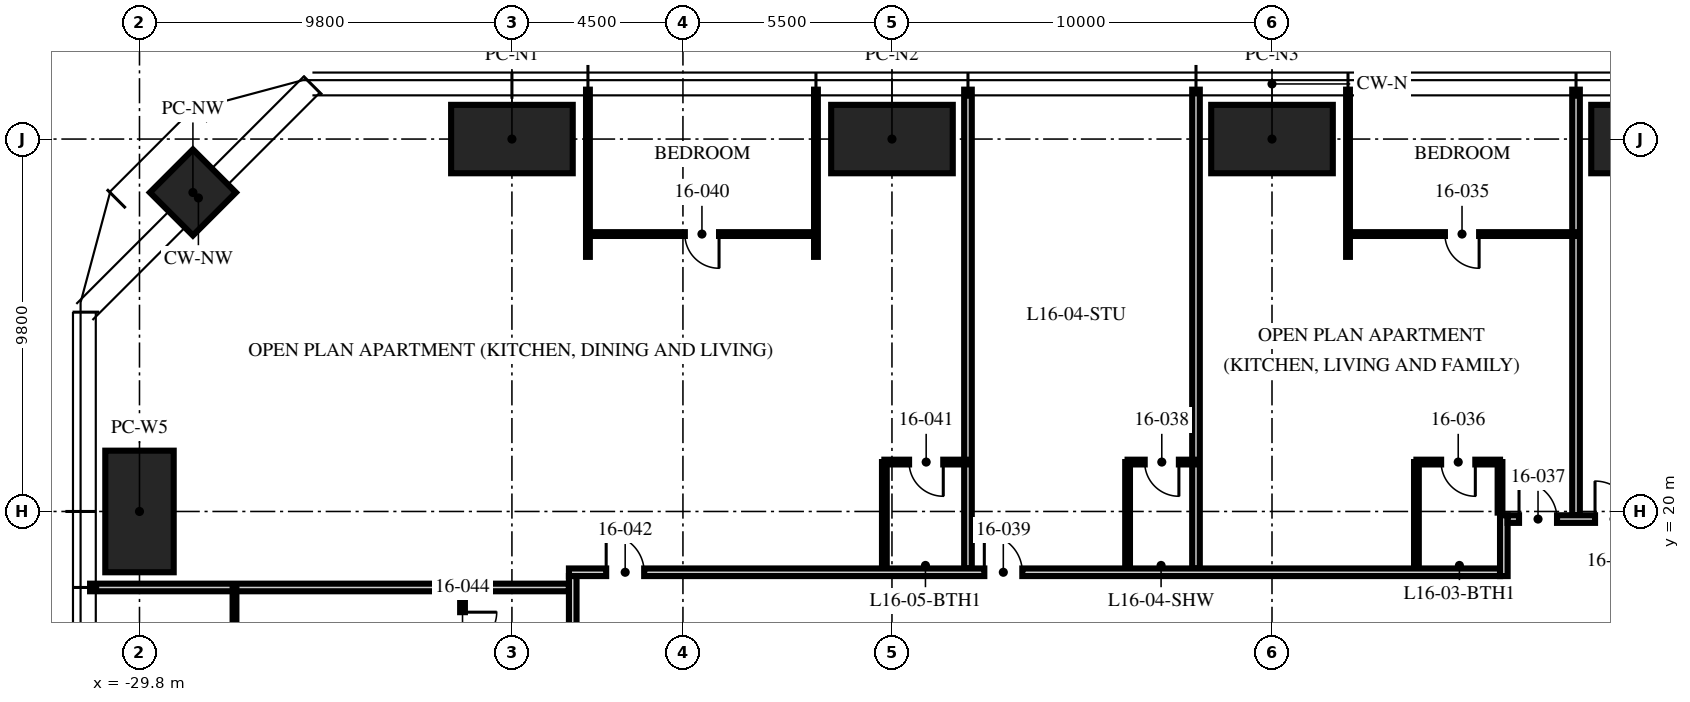
"""IFC4 building model, lengths in metres.
Left out: names, types, materials, properties, quantities, classifications, styles, units other than length and angle.
Written with IfcOpenShell. Run it as: python <this file> out.ifc"""

import sys

from ifc_helpers import new_model, si_unit, direction, frame, frame_2d, origin, origin_2d, place, context, subcontext, project, spatial, rectangle, hollow_rectangle, extrude, element, fill, save


model = new_model("IFC4")
c1 = context("Model", 3, precision=1e-05, world=origin(), true_north=direction((0.0, 1.0)))
c2 = subcontext(c1, "Body", "Model", "MODEL_VIEW")
j1 = project(units=[si_unit("LENGTHUNIT", "METRE"), si_unit("PLANEANGLEUNIT", "RADIAN")], contexts=[c1])
p1 = place(None, origin())
s1 = spatial("IfcSite", under=j1, at=p1, CompositionType="ELEMENT")
p2 = place(p1, origin())
s2 = spatial("IfcBuilding", under=s1, at=p2, CompositionType="ELEMENT")
p3 = place(p2, frame((0.0, 0.0, 66.0)))
s3 = spatial("IfcBuildingStorey", under=s2, at=p3, CompositionType="ELEMENT", Elevation=66.0)
for number, where, z_axis, x_axis in (
    (1, (-20.0, 29.8, 0.0), (0.0, 0.0, 1.0), (1.0, 0.0, 0.0)),
    (2, (-10.0, 29.8, 0.0), (0.0, 0.0, 1.0), (1.0, 0.0, 0.0)),
    (3, (0.0, 29.8, 0.0), (0.0, 0.0, 1.0), (1.0, 0.0, 0.0)),
    (4, (10.0, 29.8, 0.0), (0.0, 0.0, 1.0), (1.0, 0.0, 0.0)),
    (5, (-29.8, 20.0, 0.0), (0.0, 0.0, 1.0), (0.0, 1.0, 0.0)),
):
    element("IfcColumn", number, at=place(p3, frame(where, z_axis=z_axis, x_axis=x_axis)), inside=s3, PredefinedType="COLUMN", context=c2, shape_type="SweptSolid", body=[
        extrude(hollow_rectangle(XDim=3.2, YDim=1.8, WallThickness=0.2, at=origin_2d()), origin(), (0.0, 0.0, 1.0), 3.75),
    ])
p4 = place(p3, frame((-28.394, 28.394, 0.0), z_axis=(0.0, 0.0, 1.0), x_axis=(0.707106781187, 0.707106781187, 0.0)))
e6 = element("IfcColumn", 6, at=p4, inside=s3, PredefinedType="COLUMN", context=c2, shape_type="SweptSolid", body=[
    extrude(hollow_rectangle(XDim=1.6, YDim=1.6, WallThickness=0.1, at=origin_2d()), origin(), (0.0, 0.0, 1.0), 3.75),
])
p5 = place(p3, frame((8.0, 19.9, 0.0), z_axis=(0.0, 0.0, 1.0), x_axis=(0.0, 1.0, 0.0)))
e7 = element("IfcWall", 7, at=p5, inside=s3, PredefinedType="PARTITIONING", context=c2, shape_type="SweptSolid", body=[
    extrude(rectangle(XDim=11.2, YDim=0.2, at=frame_2d((5.6, 0.0))), origin(), (0.0, 0.0, 1.0), 2.71),
])
p6 = place(p3, frame((2.0, 26.7, 0.0), z_axis=(0.0, 0.0, 1.0), x_axis=(0.0, 1.0, 0.0)))
e8 = element("IfcWall", 8, at=p6, inside=s3, PredefinedType="PARTITIONING", context=c2, shape_type="SweptSolid", body=[
    extrude(rectangle(XDim=4.4, YDim=0.1, at=frame_2d((2.2, 0.0))), origin(), (0.0, 0.0, 1.0), 2.71),
])
for number, where, z_axis, x_axis in (
    (9, (-2.0, 18.5, 0.0), (0.0, 0.0, 1.0), (0.0, 1.0, 0.0)),
    (10, (-8.0, 18.5, 0.0), (0.0, 0.0, 1.0), (0.0, 1.0, 0.0)),
):
    element("IfcWall", number, at=place(p3, frame(where, z_axis=z_axis, x_axis=x_axis)), inside=s3, PredefinedType="PARTITIONING", context=c2, shape_type="SweptSolid", body=[
        extrude(rectangle(XDim=12.6, YDim=0.2, at=frame_2d((6.3, 0.0))), origin(), (0.0, 0.0, 1.0), 2.71),
    ])
for number, where, z_axis, x_axis in (
    (11, (-12.0, 26.7, 0.0), (0.0, 0.0, 1.0), (0.0, 1.0, 0.0)),
    (12, (-18.0, 26.7, 0.0), (0.0, 0.0, 1.0), (0.0, 1.0, 0.0)),
):
    element("IfcWall", number, at=place(p3, frame(where, z_axis=z_axis, x_axis=x_axis)), inside=s3, PredefinedType="PARTITIONING", context=c2, shape_type="SweptSolid", body=[
        extrude(rectangle(XDim=4.4, YDim=0.1, at=frame_2d((2.2, 0.0))), origin(), (0.0, 0.0, 1.0), 2.71),
    ])
p7 = place(p3, frame((-18.5, 18.0, 0.0), z_axis=(0.0, 0.0, 1.0), x_axis=(-1.0, 0.0, 0.0)))
e13 = element("IfcWall", 13, at=p7, inside=s3, PredefinedType="PARTITIONING", context=c2, shape_type="SweptSolid", body=[
    extrude(rectangle(XDim=12.6, YDim=0.2, at=frame_2d((6.3, 0.0))), origin(), (0.0, 0.0, 1.0), 2.3),
])
p8 = place(p3, frame((8.0, 27.3, 0.0), z_axis=(0.0, 0.0, 1.0), x_axis=(-1.0, 0.0, 0.0)))
e14 = element("IfcWall", 14, at=p8, inside=s3, PredefinedType="PARTITIONING", context=c2, shape_type="SweptSolid", body=[
    extrude(rectangle(XDim=6.0, YDim=0.1, at=frame_2d((3.0, 0.0))), origin(), (0.0, 0.0, 1.0), 2.61),
])
p9 = place(p8, frame((2.55, 0.0, 0.0)))
e15 = element("IfcOpeningElement", 15, at=p9, cuts=e14, PredefinedType="OPENING", context=c2, shape_type="SweptSolid", body=[
    extrude(rectangle(XDim=0.9, YDim=2.1, at=frame_2d((0.45, 1.05))), frame((0.0, 0.06, 0.0), z_axis=(0.0, -1.0, 0.0), x_axis=(1.0, 0.0, 0.0)), (0.0, 0.0, 1.0), 0.12),
])
p10 = place(p3, frame((6.0, 21.3, 0.0), z_axis=(0.0, 0.0, 1.0), x_axis=(-1.0, 0.0, 0.0)))
e16 = element("IfcWall", 16, at=p10, inside=s3, PredefinedType="PARTITIONING", context=c2, shape_type="SweptSolid", body=[
    extrude(rectangle(XDim=2.2, YDim=0.125, at=frame_2d((1.1, 0.0))), origin(), (0.0, 0.0, 1.0), 2.61),
])
p11 = place(p10, frame((0.65, 0.0, 0.0)))
e17 = element("IfcOpeningElement", 17, at=p11, cuts=e16, PredefinedType="OPENING", context=c2, shape_type="SweptSolid", body=[
    extrude(rectangle(XDim=0.9, YDim=2.1, at=frame_2d((0.45, 1.05))), frame((0.0, 0.073, 0.0), z_axis=(0.0, -1.0, 0.0), x_axis=(1.0, 0.0, 0.0)), (0.0, 0.0, 1.0), 0.145),
])
p12 = place(p3, frame((6.0, 19.97, 0.0), z_axis=(0.0, 0.0, 1.0), x_axis=(0.0, 1.0, 0.0)))
e18 = element("IfcWall", 18, at=p12, inside=s3, PredefinedType="PARTITIONING", context=c2, shape_type="SweptSolid", body=[
    extrude(rectangle(XDim=1.33, YDim=0.125, at=frame_2d((0.665, 0.0))), origin(), (0.0, 0.0, 1.0), 3.5),
])
p13 = place(p3, frame((3.8, 18.5, 0.0), z_axis=(0.0, 0.0, 1.0), x_axis=(0.0, 1.0, 0.0)))
e19 = element("IfcWall", 19, at=p13, inside=s3, PredefinedType="PARTITIONING", context=c2, shape_type="SweptSolid", body=[
    extrude(rectangle(XDim=2.8, YDim=0.125, at=frame_2d((1.4, 0.0))), origin(), (0.0, 0.0, 1.0), 3.5),
])
p14 = place(p3, frame((-2.0, 21.3, 0.0), z_axis=(0.0, 0.0, 1.0), x_axis=(-1.0, 0.0, 0.0)))
e20 = element("IfcWall", 20, at=p14, inside=s3, PredefinedType="PARTITIONING", context=c2, shape_type="SweptSolid", body=[
    extrude(rectangle(XDim=1.8, YDim=0.125, at=frame_2d((0.9, 0.0))), origin(), (0.0, 0.0, 1.0), 3.5),
])
p15 = place(p14, frame((0.45, 0.0, 0.0)))
e21 = element("IfcOpeningElement", 21, at=p15, cuts=e20, PredefinedType="OPENING", context=c2, shape_type="SweptSolid", body=[
    extrude(rectangle(XDim=0.9, YDim=2.1, at=frame_2d((0.45, 1.05))), frame((0.0, 0.073, 0.0), z_axis=(0.0, -1.0, 0.0), x_axis=(1.0, 0.0, 0.0)), (0.0, 0.0, 1.0), 0.145),
])
p16 = place(p3, frame((-3.8, 18.5, 0.0), z_axis=(0.0, 0.0, 1.0), x_axis=(0.0, 1.0, 0.0)))
e22 = element("IfcWall", 22, at=p16, inside=s3, PredefinedType="PARTITIONING", context=c2, shape_type="SweptSolid", body=[
    extrude(rectangle(XDim=2.8, YDim=0.125, at=frame_2d((1.4, 0.0))), origin(), (0.0, 0.0, 1.0), 3.5),
])
p17 = place(p3, frame((-12.0, 27.3, 0.0), z_axis=(0.0, 0.0, 1.0), x_axis=(-1.0, 0.0, 0.0)))
e23 = element("IfcWall", 23, at=p17, inside=s3, PredefinedType="PARTITIONING", context=c2, shape_type="SweptSolid", body=[
    extrude(rectangle(XDim=6.0, YDim=0.1, at=frame_2d((3.0, 0.0))), origin(), (0.0, 0.0, 1.0), 2.61),
])
p18 = place(p17, frame((2.55, 0.0, 0.0)))
e24 = element("IfcOpeningElement", 24, at=p18, cuts=e23, PredefinedType="OPENING", context=c2, shape_type="SweptSolid", body=[
    extrude(rectangle(XDim=0.9, YDim=2.1, at=frame_2d((0.45, 1.05))), frame((0.0, 0.06, 0.0), z_axis=(0.0, -1.0, 0.0), x_axis=(1.0, 0.0, 0.0)), (0.0, 0.0, 1.0), 0.12),
])
p19 = place(p3, frame((-8.0, 21.3, 0.0), z_axis=(0.0, 0.0, 1.0), x_axis=(-1.0, 0.0, 0.0)))
e25 = element("IfcWall", 25, at=p19, inside=s3, PredefinedType="PARTITIONING", context=c2, shape_type="SweptSolid", body=[
    extrude(rectangle(XDim=2.2, YDim=0.125, at=frame_2d((1.1, 0.0))), origin(), (0.0, 0.0, 1.0), 2.492),
])
p20 = place(p19, frame((0.65, 0.0, 0.0)))
e26 = element("IfcOpeningElement", 26, at=p20, cuts=e25, PredefinedType="OPENING", context=c2, shape_type="SweptSolid", body=[
    extrude(rectangle(XDim=0.9, YDim=2.1, at=frame_2d((0.45, 1.05))), frame((0.0, 0.073, 0.0), z_axis=(0.0, -1.0, 0.0), x_axis=(1.0, 0.0, 0.0)), (0.0, 0.0, 1.0), 0.145),
])
p21 = place(p3, frame((-10.2, 18.5, 0.0), z_axis=(0.0, 0.0, 1.0), x_axis=(0.0, 1.0, 0.0)))
e27 = element("IfcWall", 27, at=p21, inside=s3, PredefinedType="PARTITIONING", context=c2, shape_type="SweptSolid", body=[
    extrude(rectangle(XDim=2.8, YDim=0.125, at=frame_2d((1.4, 0.0))), origin(), (0.0, 0.0, 1.0), 2.492),
])
p22 = place(p3, frame((-27.3, 18.0, 0.0), z_axis=(0.0, 0.0, 1.0), x_axis=(0.0, -1.0, 0.0)))
e28 = element("IfcWall", 28, at=p22, inside=s3, PredefinedType="PARTITIONING", context=c2, shape_type="SweptSolid", body=[
    extrude(rectangle(XDim=6.0, YDim=0.1, at=frame_2d((3.0, 0.0))), origin(), (0.0, 0.0, 1.0), 2.61),
])
p23 = place(p22, frame((2.55, 0.0, 0.0)))
e29 = element("IfcOpeningElement", 29, at=p23, cuts=e28, PredefinedType="OPENING", context=c2, shape_type="SweptSolid", body=[
    extrude(rectangle(XDim=0.9, YDim=2.1, at=frame_2d((0.45, 1.05))), frame((0.0, 0.06, 0.0), z_axis=(0.0, -1.0, 0.0), x_axis=(1.0, 0.0, 0.0)), (0.0, 0.0, 1.0), 0.12),
])
p24 = place(p3, frame((-21.3, 18.0, 0.0), z_axis=(0.0, 0.0, 1.0), x_axis=(0.0, -1.0, 0.0)))
e30 = element("IfcWall", 30, at=p24, inside=s3, PredefinedType="PARTITIONING", context=c2, shape_type="SweptSolid", body=[
    extrude(rectangle(XDim=2.2, YDim=0.125, at=frame_2d((1.1, 0.0))), origin(), (0.0, 0.0, 1.0), 3.5),
])
p25 = place(p24, frame((0.65, 0.0, 0.0)))
e31 = element("IfcOpeningElement", 31, at=p25, cuts=e30, PredefinedType="OPENING", context=c2, shape_type="SweptSolid", body=[
    extrude(rectangle(XDim=0.9, YDim=2.1, at=frame_2d((0.45, 1.05))), frame((0.0, 0.073, 0.0), z_axis=(0.0, -1.0, 0.0), x_axis=(1.0, 0.0, 0.0)), (0.0, 0.0, 1.0), 0.145),
])
p26 = place(p3, frame((-18.5, 18.4, 0.0), z_axis=(0.0, 0.0, 1.0), x_axis=(1.0, 0.0, 0.0)))
e32 = element("IfcWall", 32, at=p26, inside=s3, PredefinedType="PARTITIONING", context=c2, shape_type="SweptSolid", body=[
    extrude(rectangle(XDim=24.5, YDim=0.2, at=frame_2d((12.25, 0.0))), origin(), (0.0, 0.0, 1.0), 2.3),
])
p27 = place(p26, frame((10.93, 0.0, 0.0)))
e33 = element("IfcOpeningElement", 33, at=p27, cuts=e32, PredefinedType="OPENING", context=c2, shape_type="SweptSolid", body=[
    extrude(rectangle(XDim=1.0, YDim=2.2, at=frame_2d((0.5, 1.1))), frame((0.0, 0.11, 0.0), z_axis=(0.0, -1.0, 0.0), x_axis=(1.0, 0.0, 0.0)), (0.0, 0.0, 1.0), 0.22),
])
p28 = place(p26, frame((0.98, 0.0, 0.0)))
e34 = element("IfcOpeningElement", 34, at=p28, cuts=e32, PredefinedType="OPENING", context=c2, shape_type="SweptSolid", body=[
    extrude(rectangle(XDim=1.0, YDim=2.2, at=frame_2d((0.5, 1.1))), frame((0.0, 0.11, 0.0), z_axis=(0.0, -1.0, 0.0), x_axis=(1.0, 0.0, 0.0)), (0.0, 0.0, 1.0), 0.22),
])
p29 = place(p3, frame((6.1, 18.3, 0.0), z_axis=(0.0, 0.0, 1.0), x_axis=(0.0, 1.0, 0.0)))
e35 = element("IfcWall", 35, at=p29, inside=s3, PredefinedType="PARTITIONING", context=c2, shape_type="SweptSolid", body=[
    extrude(rectangle(XDim=1.6, YDim=0.2, at=frame_2d((0.8, 0.0))), origin(), (0.0, 0.0, 1.0), 3.5),
])
p30 = place(p3, frame((6.2, 19.8, 0.0), z_axis=(0.0, 0.0, 1.0), x_axis=(1.0, 0.0, 0.0)))
e36 = element("IfcWall", 36, at=p30, inside=s3, PredefinedType="PARTITIONING", context=c2, shape_type="SweptSolid", body=[
    extrude(rectangle(XDim=3.6, YDim=0.2, at=frame_2d((1.8, 0.0))), origin(), (0.0, 0.0, 1.0), 3.5),
])
p31 = place(p30, frame((2.3, 0.0, 0.0)))
e37 = element("IfcOpeningElement", 37, at=p31, cuts=e36, PredefinedType="OPENING", context=c2, shape_type="SweptSolid", body=[
    extrude(rectangle(XDim=1.0, YDim=2.2, at=frame_2d((0.5, 1.1))), frame((0.0, 0.11, 0.0), z_axis=(0.0, -1.0, 0.0), x_axis=(1.0, 0.0, 0.0)), (0.0, 0.0, 1.0), 0.22),
])
p32 = place(p30, frame((0.3, 0.0, 0.0)))
e38 = element("IfcOpeningElement", 38, at=p32, cuts=e36, PredefinedType="OPENING", context=c2, shape_type="SweptSolid", body=[
    extrude(rectangle(XDim=1.0, YDim=2.2, at=frame_2d((0.5, 1.1))), frame((0.0, 0.11, 0.0), z_axis=(0.0, -1.0, 0.0), x_axis=(1.0, 0.0, 0.0)), (0.0, 0.0, 1.0), 0.22),
])
p33 = place(p3, frame((-18.4, 18.3, 0.0), z_axis=(0.0, 0.0, 1.0), x_axis=(0.0, -1.0, 0.0)))
e39 = element("IfcWall", 39, at=p33, inside=s3, PredefinedType="PARTITIONING", context=c2, shape_type="SweptSolid", body=[
    extrude(rectangle(XDim=36.6, YDim=0.2, at=frame_2d((18.3, 0.0))), origin(), (0.0, 0.0, 1.0), 2.3),
])
p34 = place(p33, frame((8.57, 0.0, 0.0)))
e40 = element("IfcOpeningElement", 40, at=p34, cuts=e39, PredefinedType="OPENING", context=c2, shape_type="SweptSolid", body=[
    extrude(rectangle(XDim=1.0, YDim=2.2, at=frame_2d((0.5, 1.1))), frame((0.0, 0.11, 0.0), z_axis=(0.0, -1.0, 0.0), x_axis=(1.0, 0.0, 0.0)), (0.0, 0.0, 1.0), 0.22),
])
p35 = place(p33, frame((14.87, 0.0, 0.0)))
e41 = element("IfcOpeningElement", 41, at=p35, cuts=e39, PredefinedType="OPENING", context=c2, shape_type="SweptSolid", body=[
    extrude(rectangle(XDim=1.0, YDim=2.2, at=frame_2d((0.5, 1.1))), frame((0.0, 0.11, 0.0), z_axis=(0.0, -1.0, 0.0), x_axis=(1.0, 0.0, 0.0)), (0.0, 0.0, 1.0), 0.22),
])
p36 = place(p33, frame((18.87, 0.0, 0.0)))
e42 = element("IfcOpeningElement", 42, at=p36, cuts=e39, PredefinedType="OPENING", context=c2, shape_type="SweptSolid", body=[
    extrude(rectangle(XDim=1.0, YDim=2.2, at=frame_2d((0.5, 1.1))), frame((0.0, 0.11, 0.0), z_axis=(0.0, -1.0, 0.0), x_axis=(1.0, 0.0, 0.0)), (0.0, 0.0, 1.0), 0.22),
])
p37 = place(p31, origin())
e43 = element("IfcDoor", 43, at=p37, inside=s3, OperationType="SINGLE_SWING_LEFT", PredefinedType="DOOR", context=c2, shape_type="SweptSolid", body=[
    extrude(rectangle(XDim=1.0, YDim=2.2, at=frame_2d((0.5, 1.1))), frame((0.0, 0.025, 0.0), z_axis=(0.0, -1.0, 0.0), x_axis=(1.0, 0.0, 0.0)), (0.0, 0.0, 1.0), 0.05),
])
fill(e37, e43)
p38 = place(p9, origin())
e44 = element("IfcDoor", 44, at=p38, inside=s3, OperationType="SINGLE_SWING_LEFT", PredefinedType="DOOR", context=c2, shape_type="SweptSolid", body=[
    extrude(rectangle(XDim=0.9, YDim=2.1, at=frame_2d((0.45, 1.05))), frame((0.0, 0.025, 0.0), z_axis=(0.0, -1.0, 0.0), x_axis=(1.0, 0.0, 0.0)), (0.0, 0.0, 1.0), 0.05),
])
fill(e15, e44)
p39 = place(p11, origin())
e45 = element("IfcDoor", 45, at=p39, inside=s3, OperationType="SINGLE_SWING_LEFT", PredefinedType="DOOR", context=c2, shape_type="SweptSolid", body=[
    extrude(rectangle(XDim=0.9, YDim=2.1, at=frame_2d((0.45, 1.05))), frame((0.0, 0.025, 0.0), z_axis=(0.0, -1.0, 0.0), x_axis=(1.0, 0.0, 0.0)), (0.0, 0.0, 1.0), 0.05),
])
fill(e17, e45)
p40 = place(p32, origin())
e46 = element("IfcDoor", 46, at=p40, inside=s3, OperationType="SINGLE_SWING_LEFT", PredefinedType="DOOR", context=c2, shape_type="SweptSolid", body=[
    extrude(rectangle(XDim=1.0, YDim=2.2, at=frame_2d((0.5, 1.1))), frame((0.0, 0.025, 0.0), z_axis=(0.0, -1.0, 0.0), x_axis=(1.0, 0.0, 0.0)), (0.0, 0.0, 1.0), 0.05),
])
fill(e38, e46)
p41 = place(p15, origin())
e47 = element("IfcDoor", 47, at=p41, inside=s3, OperationType="SINGLE_SWING_LEFT", PredefinedType="DOOR", context=c2, shape_type="SweptSolid", body=[
    extrude(rectangle(XDim=0.9, YDim=2.1, at=frame_2d((0.45, 1.05))), frame((0.0, 0.025, 0.0), z_axis=(0.0, -1.0, 0.0), x_axis=(1.0, 0.0, 0.0)), (0.0, 0.0, 1.0), 0.05),
])
fill(e21, e47)
p42 = place(p27, origin())
e48 = element("IfcDoor", 48, at=p42, inside=s3, OperationType="SINGLE_SWING_LEFT", PredefinedType="DOOR", context=c2, shape_type="SweptSolid", body=[
    extrude(rectangle(XDim=1.0, YDim=2.2, at=frame_2d((0.5, 1.1))), frame((0.0, 0.025, 0.0), z_axis=(0.0, -1.0, 0.0), x_axis=(1.0, 0.0, 0.0)), (0.0, 0.0, 1.0), 0.05),
])
fill(e33, e48)
p43 = place(p18, origin())
e49 = element("IfcDoor", 49, at=p43, inside=s3, OperationType="SINGLE_SWING_LEFT", PredefinedType="DOOR", context=c2, shape_type="SweptSolid", body=[
    extrude(rectangle(XDim=0.9, YDim=2.1, at=frame_2d((0.45, 1.05))), frame((0.0, 0.025, 0.0), z_axis=(0.0, -1.0, 0.0), x_axis=(1.0, 0.0, 0.0)), (0.0, 0.0, 1.0), 0.05),
])
fill(e24, e49)
p44 = place(p20, origin())
e50 = element("IfcDoor", 50, at=p44, inside=s3, OperationType="SINGLE_SWING_LEFT", PredefinedType="DOOR", context=c2, shape_type="SweptSolid", body=[
    extrude(rectangle(XDim=0.9, YDim=2.1, at=frame_2d((0.45, 1.05))), frame((0.0, 0.025, 0.0), z_axis=(0.0, -1.0, 0.0), x_axis=(1.0, 0.0, 0.0)), (0.0, 0.0, 1.0), 0.05),
])
fill(e26, e50)
p45 = place(p28, origin())
e51 = element("IfcDoor", 51, at=p45, inside=s3, OperationType="SINGLE_SWING_LEFT", PredefinedType="DOOR", context=c2, shape_type="SweptSolid", body=[
    extrude(rectangle(XDim=1.0, YDim=2.2, at=frame_2d((0.5, 1.1))), frame((0.0, 0.025, 0.0), z_axis=(0.0, -1.0, 0.0), x_axis=(1.0, 0.0, 0.0)), (0.0, 0.0, 1.0), 0.05),
])
fill(e34, e51)
p46 = place(p25, origin())
e52 = element("IfcDoor", 52, at=p46, inside=s3, OperationType="SINGLE_SWING_LEFT", PredefinedType="DOOR", context=c2, shape_type="SweptSolid", body=[
    extrude(rectangle(XDim=0.9, YDim=2.1, at=frame_2d((0.45, 1.05))), frame((0.0, 0.025, 0.0), z_axis=(0.0, -1.0, 0.0), x_axis=(1.0, 0.0, 0.0)), (0.0, 0.0, 1.0), 0.05),
])
fill(e31, e52)
save(model, sys.argv[1])
